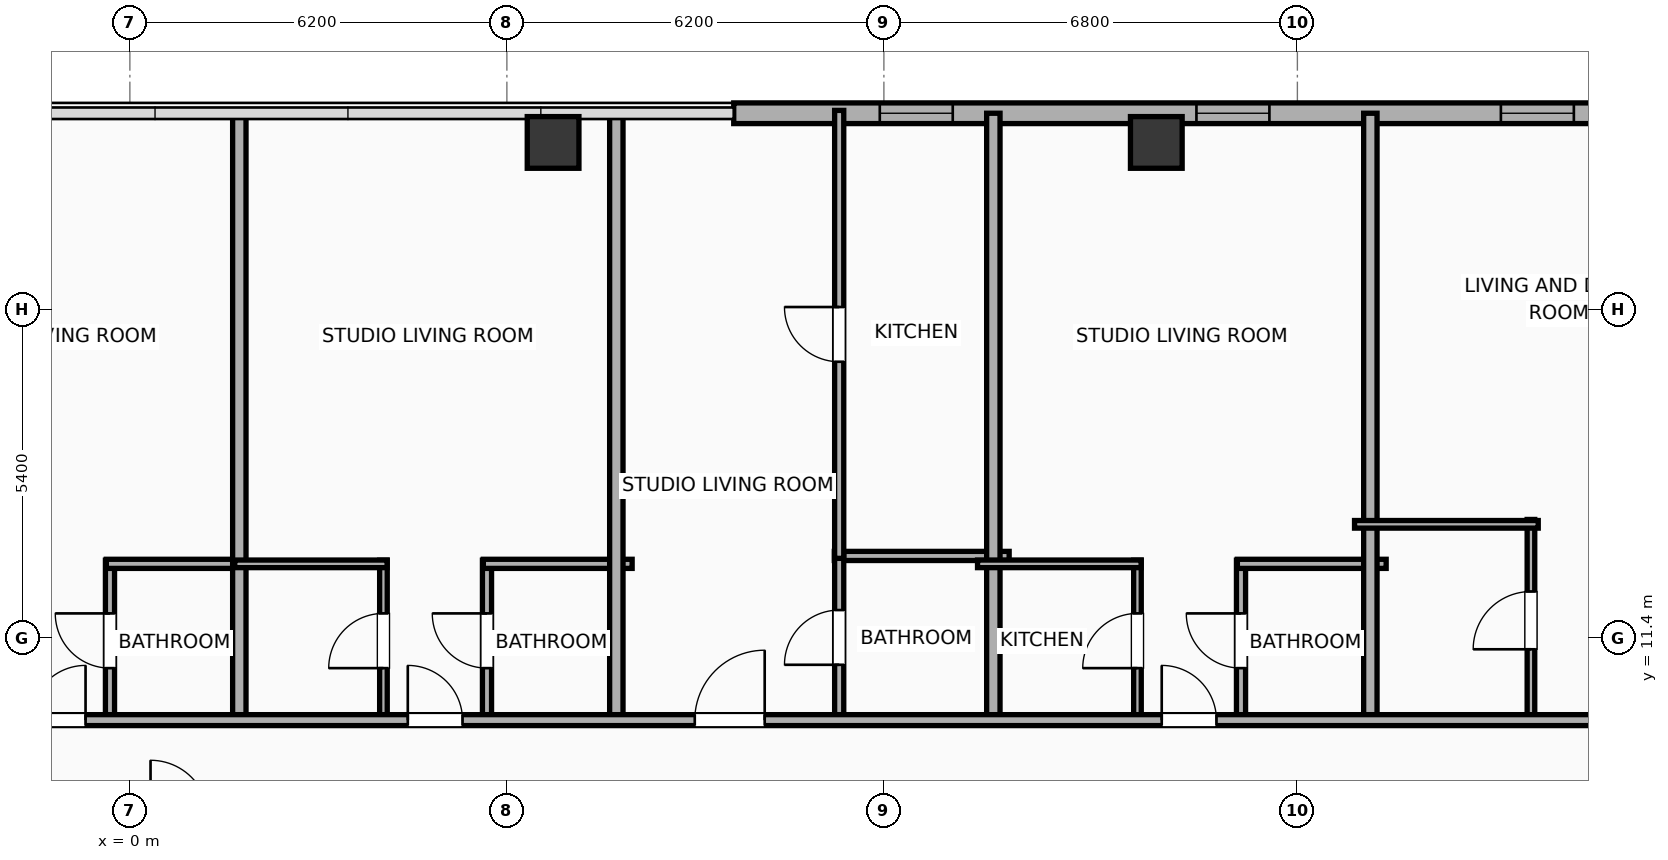
"""IFC4 building model, lengths in metres.
Left out: names, types, materials, properties, quantities, classifications, styles, units other than length and angle.
Written with IfcOpenShell. Run it as: python <this file> out.ifc"""

import sys

from ifc_helpers import new_model, si_unit, direction, frame, frame_2d, origin, origin_2d, place, context, subcontext, project, spatial, rectangle, hollow_rectangle, extrude, element, fill, save


model = new_model("IFC4")
c1 = context("Model", 3, precision=1e-05, world=origin(), true_north=direction((0.0, 1.0)))
c2 = subcontext(c1, "Body", "Model", "MODEL_VIEW")
j1 = project(units=[si_unit("LENGTHUNIT", "METRE"), si_unit("PLANEANGLEUNIT", "RADIAN")], contexts=[c1])
p1 = place(None, origin())
s1 = spatial("IfcSite", under=j1, at=p1, CompositionType="ELEMENT")
p2 = place(p1, origin())
s2 = spatial("IfcBuilding", under=s1, at=p2, CompositionType="ELEMENT")
p3 = place(p2, frame((0.0, 0.0, 211.9)))
s3 = spatial("IfcBuildingStorey", under=s2, at=p3, CompositionType="ELEMENT", Elevation=211.9)
for number, where, z_axis, x_axis in (
    (1, (16.88, 19.55, 0.0), (0.0, 0.0, 1.0), (1.0, 0.0, 0.0)),
    (2, (6.96, 19.55, 0.0), (0.0, 0.0, 1.0), (1.0, 0.0, 0.0)),
):
    element("IfcColumn", number, at=place(p3, frame(where, z_axis=z_axis, x_axis=x_axis)), inside=s3, PredefinedType="COLUMN", context=c2, shape_type="SweptSolid", body=[
        extrude(hollow_rectangle(XDim=0.85, YDim=0.85, WallThickness=0.028, at=origin_2d()), origin(), (0.0, 0.0, 1.0), 3.9),
    ])
p4 = place(p3, frame((9.931, 20.03, 0.0), z_axis=(0.0, 0.0, 1.0), x_axis=(1.0, 0.0, 0.0)))
e3 = element("IfcWall", 3, at=p4, inside=s3, PredefinedType="ELEMENTEDWALL", context=c2, shape_type="SweptSolid", body=[
    extrude(rectangle(XDim=16.853, YDim=0.34, at=frame_2d((8.426, 0.0))), origin(), (0.0, 0.0, 1.0), 3.65),
])
p5 = place(p4, frame((2.402, 0.0, 0.75)))
e4 = element("IfcOpeningElement", 4, at=p5, cuts=e3, PredefinedType="OPENING", context=c2, shape_type="SweptSolid", body=[
    extrude(rectangle(XDim=1.2, YDim=2.05, at=frame_2d((0.6, 1.025))), frame((0.0, 0.18, 0.0), z_axis=(0.0, -1.0, 0.0), x_axis=(1.0, 0.0, 0.0)), (0.0, 0.0, 1.0), 0.36),
])
p6 = place(p4, frame((7.609, 0.0, 0.75)))
e5 = element("IfcOpeningElement", 5, at=p6, cuts=e3, PredefinedType="OPENING", context=c2, shape_type="SweptSolid", body=[
    extrude(rectangle(XDim=1.2, YDim=2.05, at=frame_2d((0.6, 1.025))), frame((0.0, 0.18, 0.0), z_axis=(0.0, -1.0, 0.0), x_axis=(1.0, 0.0, 0.0)), (0.0, 0.0, 1.0), 0.36),
])
p7 = place(p4, frame((12.616, 0.0, 0.75)))
e6 = element("IfcOpeningElement", 6, at=p7, cuts=e3, PredefinedType="OPENING", context=c2, shape_type="SweptSolid", body=[
    extrude(rectangle(XDim=1.2, YDim=2.05, at=frame_2d((0.6, 1.025))), frame((0.0, 0.18, 0.0), z_axis=(0.0, -1.0, 0.0), x_axis=(1.0, 0.0, 0.0)), (0.0, 0.0, 1.0), 0.36),
])
p8 = place(p3, frame((-0.327, 10.03, 0.0), z_axis=(0.0, 0.0, 1.0), x_axis=(0.0, 1.0, 0.0)))
e7 = element("IfcWall", 7, at=p8, inside=s3, PredefinedType="PLUMBINGWALL", context=c2, shape_type="SweptSolid", body=[
    extrude(rectangle(XDim=2.65, YDim=0.15, at=frame_2d((1.325, 0.0))), origin(), (0.0, 0.0, 1.0), 3.65),
])
p9 = place(p8, frame((0.875, 0.0, 0.0)))
e8 = element("IfcOpeningElement", 8, at=p9, cuts=e7, PredefinedType="OPENING", context=c2, shape_type="SweptSolid", body=[
    extrude(rectangle(XDim=0.9, YDim=2.05, at=frame_2d((0.45, 1.025))), frame((0.0, 0.085, 0.0), z_axis=(0.0, -1.0, 0.0), x_axis=(1.0, 0.0, 0.0)), (0.0, 0.0, 1.0), 0.17),
])
p10 = place(p3, frame((-0.387, 12.62, 0.0), z_axis=(0.0, 0.0, 1.0), x_axis=(1.0, 0.0, 0.0)))
e9 = element("IfcWall", 9, at=p10, inside=s3, PredefinedType="PLUMBINGWALL", context=c2, shape_type="SweptSolid", body=[
    extrude(rectangle(XDim=2.262, YDim=0.15, at=frame_2d((1.131, 0.0))), origin(), (0.0, 0.0, 1.0), 3.65),
])
p11 = place(p3, frame((1.8, 9.97, 0.0), z_axis=(0.0, 0.0, 1.0), x_axis=(0.0, 1.0, 0.0)))
e10 = element("IfcWall", 10, at=p11, inside=s3, PredefinedType="PARTITIONING", context=c2, shape_type="SweptSolid", body=[
    extrude(rectangle(XDim=10.06, YDim=0.22, at=frame_2d((5.03, 0.0))), origin(), (0.0, 0.0, 1.0), 3.65),
])
p12 = place(p3, frame((4.17, 10.03, 0.0), z_axis=(0.0, 0.0, 1.0), x_axis=(0.0, 1.0, 0.0)))
e11 = element("IfcWall", 11, at=p12, inside=s3, PredefinedType="PARTITIONING", context=c2, shape_type="SweptSolid", body=[
    extrude(rectangle(XDim=2.65, YDim=0.125, at=frame_2d((1.325, 0.0))), origin(), (0.0, 0.0, 1.0), 3.65),
])
p13 = place(p12, frame((0.875, 0.0, 0.0)))
e12 = element("IfcOpeningElement", 12, at=p13, cuts=e11, PredefinedType="OPENING", context=c2, shape_type="SweptSolid", body=[
    extrude(rectangle(XDim=0.9, YDim=2.05, at=frame_2d((0.45, 1.025))), frame((0.0, 0.073, 0.0), z_axis=(0.0, -1.0, 0.0), x_axis=(1.0, 0.0, 0.0)), (0.0, 0.0, 1.0), 0.145),
])
p14 = place(p3, frame((5.873, 10.03, 0.0), z_axis=(0.0, 0.0, 1.0), x_axis=(0.0, 1.0, 0.0)))
e13 = element("IfcWall", 13, at=p14, inside=s3, PredefinedType="PLUMBINGWALL", context=c2, shape_type="SweptSolid", body=[
    extrude(rectangle(XDim=2.65, YDim=0.15, at=frame_2d((1.325, 0.0))), origin(), (0.0, 0.0, 1.0), 3.65),
])
p15 = place(p14, frame((0.875, 0.0, 0.0)))
e14 = element("IfcOpeningElement", 14, at=p15, cuts=e13, PredefinedType="OPENING", context=c2, shape_type="SweptSolid", body=[
    extrude(rectangle(XDim=0.9, YDim=2.05, at=frame_2d((0.45, 1.025))), frame((0.0, 0.085, 0.0), z_axis=(0.0, -1.0, 0.0), x_axis=(1.0, 0.0, 0.0)), (0.0, 0.0, 1.0), 0.17),
])
p16 = place(p3, frame((1.725, 12.62, 0.0), z_axis=(0.0, 0.0, 1.0), x_axis=(1.0, 0.0, 0.0)))
e15 = element("IfcWall", 15, at=p16, inside=s3, PredefinedType="PARTITIONING", context=c2, shape_type="SweptSolid", body=[
    extrude(rectangle(XDim=2.505, YDim=0.125, at=frame_2d((1.252, 0.0))), origin(), (0.0, 0.0, 1.0), 3.65),
])
p17 = place(p3, frame((5.813, 12.62, 0.0), z_axis=(0.0, 0.0, 1.0), x_axis=(1.0, 0.0, 0.0)))
e16 = element("IfcWall", 16, at=p17, inside=s3, PredefinedType="PLUMBINGWALL", context=c2, shape_type="SweptSolid", body=[
    extrude(rectangle(XDim=2.447, YDim=0.15, at=frame_2d((1.224, 0.0))), origin(), (0.0, 0.0, 1.0), 3.65),
])
p18 = place(p3, frame((8.0, 9.97, 0.0), z_axis=(0.0, 0.0, 1.0), x_axis=(0.0, 1.0, 0.0)))
e17 = element("IfcWall", 17, at=p18, inside=s3, PredefinedType="PARTITIONING", context=c2, shape_type="SweptSolid", body=[
    extrude(rectangle(XDim=10.06, YDim=0.22, at=frame_2d((5.03, 0.0))), origin(), (0.0, 0.0, 1.0), 3.65),
])
p19 = place(p3, frame((11.585, 12.75, 0.0), z_axis=(0.0, 0.0, 1.0), x_axis=(1.0, 0.0, 0.0)))
e18 = element("IfcWall", 18, at=p19, inside=s3, PredefinedType="PLUMBINGWALL", context=c2, shape_type="SweptSolid", body=[
    extrude(rectangle(XDim=2.875, YDim=0.15, at=frame_2d((1.438, 0.0))), origin(), (0.0, 0.0, 1.0), 3.65),
])
p20 = place(p3, frame((11.665, 10.03, 0.0), z_axis=(0.0, 0.0, 1.0), x_axis=(0.0, 1.0, 0.0)))
e19 = element("IfcWall", 19, at=p20, inside=s3, PredefinedType="PLUMBINGWALL", context=c2, shape_type="SweptSolid", body=[
    extrude(rectangle(XDim=2.76, YDim=0.15, at=frame_2d((1.38, 0.0))), origin(), (0.0, 0.0, 1.0), 3.65),
])
p21 = place(p20, frame((0.93, 0.0, 0.0)))
e20 = element("IfcOpeningElement", 20, at=p21, cuts=e19, PredefinedType="OPENING", context=c2, shape_type="SweptSolid", body=[
    extrude(rectangle(XDim=0.9, YDim=2.05, at=frame_2d((0.45, 1.025))), frame((0.0, 0.085, 0.0), z_axis=(0.0, -1.0, 0.0), x_axis=(1.0, 0.0, 0.0)), (0.0, 0.0, 1.0), 0.17),
])
p22 = place(p3, frame((11.665, 12.71, 0.0), z_axis=(0.0, 0.0, 1.0), x_axis=(0.0, 1.0, 0.0)))
e21 = element("IfcWall", 21, at=p22, inside=s3, PredefinedType="PLUMBINGWALL", context=c2, shape_type="SweptSolid", body=[
    extrude(rectangle(XDim=7.367, YDim=0.15, at=frame_2d((3.684, 0.0))), origin(), (0.0, 0.0, 1.0), 3.65),
])
p23 = place(p22, frame((3.233, 0.0, 0.0)))
e22 = element("IfcOpeningElement", 22, at=p23, cuts=e21, PredefinedType="OPENING", context=c2, shape_type="SweptSolid", body=[
    extrude(rectangle(XDim=0.9, YDim=2.05, at=frame_2d((0.45, 1.025))), frame((0.0, 0.085, 0.0), z_axis=(0.0, -1.0, 0.0), x_axis=(1.0, 0.0, 0.0)), (0.0, 0.0, 1.0), 0.17),
])
p24 = place(p3, frame((14.2, 9.97, 0.0), z_axis=(0.0, 0.0, 1.0), x_axis=(0.0, 1.0, 0.0)))
e23 = element("IfcWall", 23, at=p24, inside=s3, PredefinedType="PARTITIONING", context=c2, shape_type="SweptSolid", body=[
    extrude(rectangle(XDim=10.06, YDim=0.22, at=frame_2d((5.03, 0.0))), origin(), (0.0, 0.0, 1.0), 3.65),
])
p25 = place(p3, frame((16.57, 10.03, 0.0), z_axis=(0.0, 0.0, 1.0), x_axis=(0.0, 1.0, 0.0)))
e24 = element("IfcWall", 24, at=p25, inside=s3, PredefinedType="PARTITIONING", context=c2, shape_type="SweptSolid", body=[
    extrude(rectangle(XDim=2.65, YDim=0.125, at=frame_2d((1.325, 0.0))), origin(), (0.0, 0.0, 1.0), 3.65),
])
p26 = place(p25, frame((0.875, 0.0, 0.0)))
e25 = element("IfcOpeningElement", 25, at=p26, cuts=e24, PredefinedType="OPENING", context=c2, shape_type="SweptSolid", body=[
    extrude(rectangle(XDim=0.9, YDim=2.05, at=frame_2d((0.45, 1.025))), frame((0.0, 0.073, 0.0), z_axis=(0.0, -1.0, 0.0), x_axis=(1.0, 0.0, 0.0)), (0.0, 0.0, 1.0), 0.145),
])
p27 = place(p3, frame((18.273, 10.03, 0.0), z_axis=(0.0, 0.0, 1.0), x_axis=(0.0, 1.0, 0.0)))
e26 = element("IfcWall", 26, at=p27, inside=s3, PredefinedType="PLUMBINGWALL", context=c2, shape_type="SweptSolid", body=[
    extrude(rectangle(XDim=2.65, YDim=0.15, at=frame_2d((1.325, 0.0))), origin(), (0.0, 0.0, 1.0), 3.65),
])
p28 = place(p27, frame((0.875, 0.0, 0.0)))
e27 = element("IfcOpeningElement", 27, at=p28, cuts=e26, PredefinedType="OPENING", context=c2, shape_type="SweptSolid", body=[
    extrude(rectangle(XDim=0.9, YDim=2.05, at=frame_2d((0.45, 1.025))), frame((0.0, 0.085, 0.0), z_axis=(0.0, -1.0, 0.0), x_axis=(1.0, 0.0, 0.0)), (0.0, 0.0, 1.0), 0.17),
])
p29 = place(p3, frame((13.94, 12.62, 0.0), z_axis=(0.0, 0.0, 1.0), x_axis=(1.0, 0.0, 0.0)))
e28 = element("IfcWall", 28, at=p29, inside=s3, PredefinedType="PARTITIONING", context=c2, shape_type="SweptSolid", body=[
    extrude(rectangle(XDim=2.69, YDim=0.125, at=frame_2d((1.345, 0.0))), origin(), (0.0, 0.0, 1.0), 3.65),
])
p30 = place(p3, frame((18.213, 12.62, 0.0), z_axis=(0.0, 0.0, 1.0), x_axis=(1.0, 0.0, 0.0)))
e29 = element("IfcWall", 29, at=p30, inside=s3, PredefinedType="PLUMBINGWALL", context=c2, shape_type="SweptSolid", body=[
    extrude(rectangle(XDim=2.447, YDim=0.15, at=frame_2d((1.224, 0.0))), origin(), (0.0, 0.0, 1.0), 3.65),
])
p31 = place(p3, frame((20.4, 9.97, 0.0), z_axis=(0.0, 0.0, 1.0), x_axis=(0.0, 1.0, 0.0)))
e30 = element("IfcWall", 30, at=p31, inside=s3, PredefinedType="PARTITIONING", context=c2, shape_type="SweptSolid", body=[
    extrude(rectangle(XDim=10.06, YDim=0.22, at=frame_2d((5.03, 0.0))), origin(), (0.0, 0.0, 1.0), 3.65),
])
p32 = place(p3, frame((23.041, 10.03, 0.0), z_axis=(0.0, 0.0, 1.0), x_axis=(0.0, 1.0, 0.0)))
e31 = element("IfcWall", 31, at=p32, inside=s3, PredefinedType="PARTITIONING", context=c2, shape_type="SweptSolid", body=[
    extrude(rectangle(XDim=3.32, YDim=0.125, at=frame_2d((1.66, 0.0))), origin(), (0.0, 0.0, 1.0), 3.65),
])
p33 = place(p32, frame((1.185, 0.0, 0.0)))
e32 = element("IfcOpeningElement", 32, at=p33, cuts=e31, PredefinedType="OPENING", context=c2, shape_type="SweptSolid", body=[
    extrude(rectangle(XDim=0.95, YDim=2.05, at=frame_2d((0.475, 1.025))), frame((0.0, 0.073, 0.0), z_axis=(0.0, -1.0, 0.0), x_axis=(1.0, 0.0, 0.0)), (0.0, 0.0, 1.0), 0.145),
])
p34 = place(p3, frame((20.14, 13.27, 0.0), z_axis=(0.0, 0.0, 1.0), x_axis=(1.0, 0.0, 0.0)))
e33 = element("IfcWall", 33, at=p34, inside=s3, PredefinedType="PARTITIONING", context=c2, shape_type="SweptSolid", body=[
    extrude(rectangle(XDim=3.021, YDim=0.125, at=frame_2d((1.51, 0.0))), origin(), (0.0, 0.0, 1.0), 3.65),
])
p35 = place(p3, frame((-26.23, 10.05, 0.0), z_axis=(0.0, 0.0, 1.0), x_axis=(1.0, 0.0, 0.0)))
e34 = element("IfcWall", 34, at=p35, inside=s3, PredefinedType="PARTITIONING", context=c2, shape_type="SweptSolid", body=[
    extrude(rectangle(XDim=56.46, YDim=0.18, at=frame_2d((28.23, 0.0))), origin(), (0.0, 0.0, 1.0), 3.65),
])
p36 = place(p35, frame((4.41, 0.0, 0.0)))
e35 = element("IfcOpeningElement", 35, at=p36, cuts=e34, PredefinedType="OPENING", context=c2, shape_type="SweptSolid", body=[
    extrude(rectangle(XDim=1.15, YDim=2.05, at=frame_2d((0.575, 1.025))), frame((0.0, 0.1, 0.0), z_axis=(0.0, -1.0, 0.0), x_axis=(1.0, 0.0, 0.0)), (0.0, 0.0, 1.0), 0.2),
])
p37 = place(p35, frame((12.203, 0.0, 0.0)))
e36 = element("IfcOpeningElement", 36, at=p37, cuts=e34, PredefinedType="OPENING", context=c2, shape_type="SweptSolid", body=[
    extrude(rectangle(XDim=0.9, YDim=2.05, at=frame_2d((0.45, 1.025))), frame((0.0, 0.1, 0.0), z_axis=(0.0, -1.0, 0.0), x_axis=(1.0, 0.0, 0.0)), (0.0, 0.0, 1.0), 0.2),
])
p38 = place(p35, frame((19.429, 0.0, 0.0)))
e37 = element("IfcOpeningElement", 37, at=p38, cuts=e34, PredefinedType="OPENING", context=c2, shape_type="SweptSolid", body=[
    extrude(rectangle(XDim=1.15, YDim=2.05, at=frame_2d((0.575, 1.025))), frame((0.0, 0.1, 0.0), z_axis=(0.0, -1.0, 0.0), x_axis=(1.0, 0.0, 0.0)), (0.0, 0.0, 1.0), 0.2),
])
p39 = place(p35, frame((24.601, 0.0, 0.0)))
e38 = element("IfcOpeningElement", 38, at=p39, cuts=e34, PredefinedType="OPENING", context=c2, shape_type="SweptSolid", body=[
    extrude(rectangle(XDim=0.9, YDim=2.05, at=frame_2d((0.45, 1.025))), frame((0.0, 0.1, 0.0), z_axis=(0.0, -1.0, 0.0), x_axis=(1.0, 0.0, 0.0)), (0.0, 0.0, 1.0), 0.2),
])
p40 = place(p35, frame((30.801, 0.0, 0.0)))
e39 = element("IfcOpeningElement", 39, at=p40, cuts=e34, PredefinedType="OPENING", context=c2, shape_type="SweptSolid", body=[
    extrude(rectangle(XDim=0.9, YDim=2.05, at=frame_2d((0.45, 1.025))), frame((0.0, 0.1, 0.0), z_axis=(0.0, -1.0, 0.0), x_axis=(1.0, 0.0, 0.0)), (0.0, 0.0, 1.0), 0.2),
])
p41 = place(p35, frame((35.52, 0.0, 0.0)))
e40 = element("IfcOpeningElement", 40, at=p41, cuts=e34, PredefinedType="OPENING", context=c2, shape_type="SweptSolid", body=[
    extrude(rectangle(XDim=1.15, YDim=2.05, at=frame_2d((0.575, 1.025))), frame((0.0, 0.1, 0.0), z_axis=(0.0, -1.0, 0.0), x_axis=(1.0, 0.0, 0.0)), (0.0, 0.0, 1.0), 0.2),
])
p42 = place(p35, frame((43.199, 0.0, 0.0)))
e41 = element("IfcOpeningElement", 41, at=p42, cuts=e34, PredefinedType="OPENING", context=c2, shape_type="SweptSolid", body=[
    extrude(rectangle(XDim=0.9, YDim=2.05, at=frame_2d((0.45, 1.025))), frame((0.0, 0.1, 0.0), z_axis=(0.0, -1.0, 0.0), x_axis=(1.0, 0.0, 0.0)), (0.0, 0.0, 1.0), 0.2),
])
p43 = place(p35, frame((51.334, 0.0, 0.0)))
e42 = element("IfcOpeningElement", 42, at=p43, cuts=e34, PredefinedType="OPENING", context=c2, shape_type="SweptSolid", body=[
    extrude(rectangle(XDim=1.15, YDim=2.05, at=frame_2d((0.575, 1.025))), frame((0.0, 0.1, 0.0), z_axis=(0.0, -1.0, 0.0), x_axis=(1.0, 0.0, 0.0)), (0.0, 0.0, 1.0), 0.2),
])
p44 = place(p5, origin())
e43 = element("IfcWindow", 43, at=p44, inside=s3, PartitioningType="SINGLE_PANEL", PredefinedType="WINDOW", context=c2, shape_type="SweptSolid", body=[
    extrude(rectangle(XDim=1.2, YDim=2.05, at=frame_2d((0.6, 1.025))), frame((0.0, 0.03, 0.0), z_axis=(0.0, -1.0, 0.0), x_axis=(1.0, 0.0, 0.0)), (0.0, 0.0, 1.0), 0.06),
])
fill(e4, e43)
p45 = place(p6, origin())
e44 = element("IfcWindow", 44, at=p45, inside=s3, PartitioningType="SINGLE_PANEL", PredefinedType="WINDOW", context=c2, shape_type="SweptSolid", body=[
    extrude(rectangle(XDim=1.2, YDim=2.05, at=frame_2d((0.6, 1.025))), frame((0.0, 0.03, 0.0), z_axis=(0.0, -1.0, 0.0), x_axis=(1.0, 0.0, 0.0)), (0.0, 0.0, 1.0), 0.06),
])
fill(e5, e44)
p46 = place(p7, origin())
e45 = element("IfcWindow", 45, at=p46, inside=s3, PartitioningType="SINGLE_PANEL", PredefinedType="WINDOW", context=c2, shape_type="SweptSolid", body=[
    extrude(rectangle(XDim=1.2, YDim=2.05, at=frame_2d((0.6, 1.025))), frame((0.0, 0.03, 0.0), z_axis=(0.0, -1.0, 0.0), x_axis=(1.0, 0.0, 0.0)), (0.0, 0.0, 1.0), 0.06),
])
fill(e6, e45)
p47 = place(p9, origin())
e46 = element("IfcDoor", 46, at=p47, inside=s3, OperationType="SINGLE_SWING_RIGHT", PredefinedType="DOOR", context=c2, shape_type="SweptSolid", body=[
    extrude(rectangle(XDim=0.9, YDim=2.05, at=frame_2d((0.45, 1.025))), frame((0.0, 0.025, 0.0), z_axis=(0.0, -1.0, 0.0), x_axis=(1.0, 0.0, 0.0)), (0.0, 0.0, 1.0), 0.05),
])
fill(e8, e46)
p48 = place(p13, origin())
e47 = element("IfcDoor", 47, at=p48, inside=s3, OperationType="SINGLE_SWING_LEFT", PredefinedType="DOOR", context=c2, shape_type="SweptSolid", body=[
    extrude(rectangle(XDim=0.9, YDim=2.05, at=frame_2d((0.45, 1.025))), frame((0.0, 0.025, 0.0), z_axis=(0.0, -1.0, 0.0), x_axis=(1.0, 0.0, 0.0)), (0.0, 0.0, 1.0), 0.05),
])
fill(e12, e47)
p49 = place(p15, origin())
e48 = element("IfcDoor", 48, at=p49, inside=s3, OperationType="SINGLE_SWING_RIGHT", PredefinedType="DOOR", context=c2, shape_type="SweptSolid", body=[
    extrude(rectangle(XDim=0.9, YDim=2.05, at=frame_2d((0.45, 1.025))), frame((0.0, 0.025, 0.0), z_axis=(0.0, -1.0, 0.0), x_axis=(1.0, 0.0, 0.0)), (0.0, 0.0, 1.0), 0.05),
])
fill(e14, e48)
p50 = place(p21, origin())
e49 = element("IfcDoor", 49, at=p50, inside=s3, OperationType="SINGLE_SWING_LEFT", PredefinedType="DOOR", context=c2, shape_type="SweptSolid", body=[
    extrude(rectangle(XDim=0.9, YDim=2.05, at=frame_2d((0.45, 1.025))), frame((0.0, 0.025, 0.0), z_axis=(0.0, -1.0, 0.0), x_axis=(1.0, 0.0, 0.0)), (0.0, 0.0, 1.0), 0.05),
])
fill(e20, e49)
p51 = place(p23, origin())
e50 = element("IfcDoor", 50, at=p51, inside=s3, OperationType="SINGLE_SWING_RIGHT", PredefinedType="DOOR", context=c2, shape_type="SweptSolid", body=[
    extrude(rectangle(XDim=0.9, YDim=2.05, at=frame_2d((0.45, 1.025))), frame((0.0, 0.025, 0.0), z_axis=(0.0, -1.0, 0.0), x_axis=(1.0, 0.0, 0.0)), (0.0, 0.0, 1.0), 0.05),
])
fill(e22, e50)
p52 = place(p26, origin())
e51 = element("IfcDoor", 51, at=p52, inside=s3, OperationType="SINGLE_SWING_LEFT", PredefinedType="DOOR", context=c2, shape_type="SweptSolid", body=[
    extrude(rectangle(XDim=0.9, YDim=2.05, at=frame_2d((0.45, 1.025))), frame((0.0, 0.025, 0.0), z_axis=(0.0, -1.0, 0.0), x_axis=(1.0, 0.0, 0.0)), (0.0, 0.0, 1.0), 0.05),
])
fill(e25, e51)
p53 = place(p28, origin())
e52 = element("IfcDoor", 52, at=p53, inside=s3, OperationType="SINGLE_SWING_RIGHT", PredefinedType="DOOR", context=c2, shape_type="SweptSolid", body=[
    extrude(rectangle(XDim=0.9, YDim=2.05, at=frame_2d((0.45, 1.025))), frame((0.0, 0.025, 0.0), z_axis=(0.0, -1.0, 0.0), x_axis=(1.0, 0.0, 0.0)), (0.0, 0.0, 1.0), 0.05),
])
fill(e27, e52)
p54 = place(p33, origin())
e53 = element("IfcDoor", 53, at=p54, inside=s3, OperationType="SINGLE_SWING_LEFT", PredefinedType="DOOR", context=c2, shape_type="SweptSolid", body=[
    extrude(rectangle(XDim=0.95, YDim=2.05, at=frame_2d((0.475, 1.025))), frame((0.0, 0.025, 0.0), z_axis=(0.0, -1.0, 0.0), x_axis=(1.0, 0.0, 0.0)), (0.0, 0.0, 1.0), 0.05),
])
fill(e32, e53)
p55 = place(p39, origin())
e54 = element("IfcDoor", 54, at=p55, inside=s3, OperationType="SINGLE_SWING_RIGHT", PredefinedType="DOOR", context=c2, shape_type="SweptSolid", body=[
    extrude(rectangle(XDim=0.9, YDim=2.05, at=frame_2d((0.45, 1.025))), frame((0.0, 0.025, 0.0), z_axis=(0.0, -1.0, 0.0), x_axis=(1.0, 0.0, 0.0)), (0.0, 0.0, 1.0), 0.05),
])
fill(e38, e54)
p56 = place(p40, origin())
e55 = element("IfcDoor", 55, at=p56, inside=s3, OperationType="SINGLE_SWING_LEFT", PredefinedType="DOOR", context=c2, shape_type="SweptSolid", body=[
    extrude(rectangle(XDim=0.9, YDim=2.05, at=frame_2d((0.45, 1.025))), frame((0.0, 0.025, 0.0), z_axis=(0.0, -1.0, 0.0), x_axis=(1.0, 0.0, 0.0)), (0.0, 0.0, 1.0), 0.05),
])
fill(e39, e55)
p57 = place(p41, origin())
e56 = element("IfcDoor", 56, at=p57, inside=s3, OperationType="SINGLE_SWING_RIGHT", PredefinedType="DOOR", context=c2, shape_type="SweptSolid", body=[
    extrude(rectangle(XDim=1.15, YDim=2.05, at=frame_2d((0.575, 1.025))), frame((0.0, 0.025, 0.0), z_axis=(0.0, -1.0, 0.0), x_axis=(1.0, 0.0, 0.0)), (0.0, 0.0, 1.0), 0.05),
])
fill(e40, e56)
p58 = place(p42, origin())
e57 = element("IfcDoor", 57, at=p58, inside=s3, OperationType="SINGLE_SWING_LEFT", PredefinedType="DOOR", context=c2, shape_type="SweptSolid", body=[
    extrude(rectangle(XDim=0.9, YDim=2.05, at=frame_2d((0.45, 1.025))), frame((0.0, 0.025, 0.0), z_axis=(0.0, -1.0, 0.0), x_axis=(1.0, 0.0, 0.0)), (0.0, 0.0, 1.0), 0.05),
])
fill(e41, e57)
save(model, sys.argv[1])
